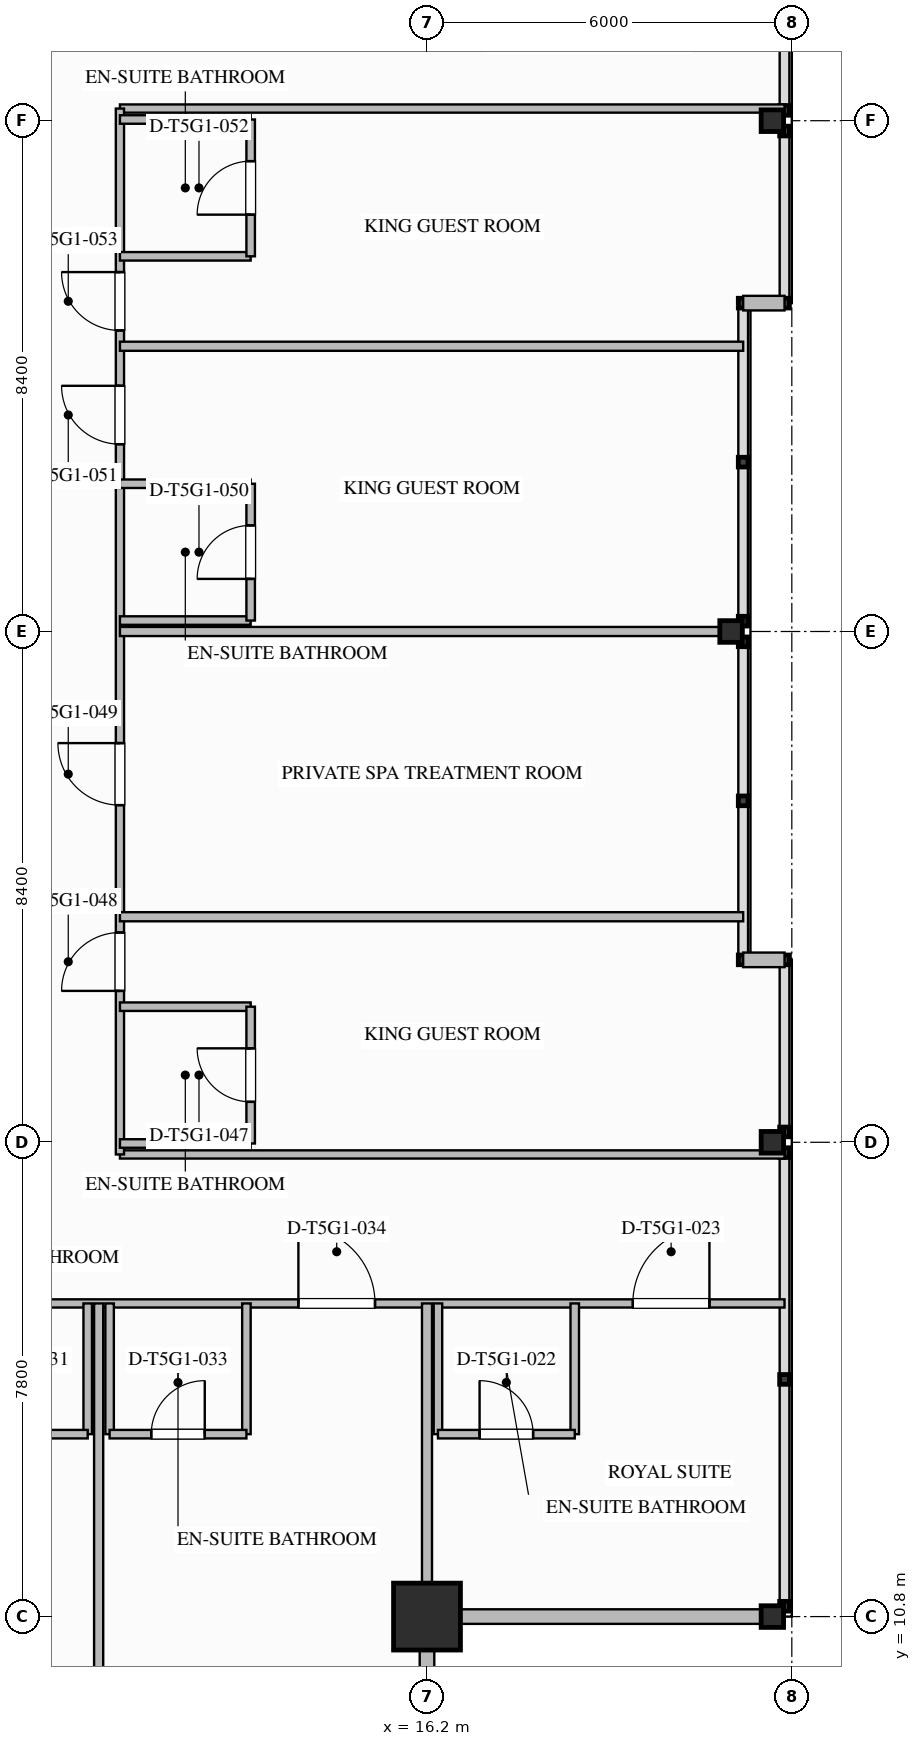
"""IFC4 building model, lengths in metres.
Left out: names, types, materials, properties, quantities, classifications, styles, units other than length and angle.
Written with IfcOpenShell. Run it as: python <this file> out.ifc"""

import sys

from ifc_helpers import new_model, si_unit, direction, frame, frame_2d, origin, origin_2d, place, context, subcontext, project, spatial, rectangle, i_section, extrude, element, fill, save


model = new_model("IFC4")
c1 = context("Model", 3, precision=1e-05, world=origin(), true_north=direction((0.0, 1.0)))
c2 = subcontext(c1, "Body", "Model", "MODEL_VIEW")
j1 = project(units=[si_unit("LENGTHUNIT", "METRE"), si_unit("PLANEANGLEUNIT", "RADIAN")], contexts=[c1])
p1 = place(None, origin())
s1 = spatial("IfcSite", under=j1, at=p1, CompositionType="ELEMENT")
p2 = place(p1, origin())
s2 = spatial("IfcBuilding", under=s1, at=p2, CompositionType="ELEMENT")
p3 = place(p2, frame((0.0, 0.0, 272.3)))
s3 = spatial("IfcBuildingStorey", under=s2, at=p3, CompositionType="ELEMENT", Elevation=272.3)
p4 = place(p3, frame((16.2, 10.8, 0.0), z_axis=(0.0, 0.0, 1.0), x_axis=(1.0, 0.0, 0.0)))
e1 = element("IfcColumn", 1, at=p4, inside=s3, PredefinedType="COLUMN", context=c2, shape_type="SweptSolid", body=[
    extrude(rectangle(XDim=1.1, YDim=1.1, at=origin_2d()), origin(), (0.0, 0.0, 1.0), 3.65),
])
for number, where, z_axis, x_axis in (
    (2, (21.88, 10.8, 0.0), (0.0, 0.0, 1.0), (1.0, 0.0, 0.0)),
    (3, (21.88, 18.6, 0.0), (0.0, 0.0, 1.0), (1.0, 0.0, 0.0)),
    (4, (21.2, 27.0, 0.0), (0.0, 0.0, 1.0), (1.0, 0.0, 0.0)),
    (5, (21.88, 35.4, 0.0), (0.0, 0.0, 1.0), (1.0, 0.0, 0.0)),
):
    element("IfcColumn", number, at=place(p3, frame(where, z_axis=z_axis, x_axis=x_axis)), inside=s3, PredefinedType="COLUMN", context=c2, shape_type="SweptSolid", body=[
        extrude(i_section(OverallWidth=0.369, OverallDepth=0.356, WebThickness=0.011, FlangeThickness=0.018, FilletRadius=0.025, at=origin_2d()), origin(), (0.0, 0.0, 1.0), 3.647),
    ])
for number, where, z_axis, x_axis in (
    (6, (22.08, 10.8, 0.0), (0.0, 0.0, 1.0), (-1.0, 0.0, 0.0)),
    (7, (16.2, 10.8, 0.0), (0.0, 0.0, 1.0), (0.0, -1.0, 0.0)),
):
    element("IfcWall", number, at=place(p3, frame(where, z_axis=z_axis, x_axis=x_axis)), inside=s3, PredefinedType="STANDARD", context=c2, shape_type="SweptSolid", body=[
        extrude(rectangle(XDim=5.88, YDim=0.24, at=frame_2d((2.94, 0.0))), origin(), (0.0, 0.0, 1.0), 2.779),
    ])
for number, where, z_axis, x_axis in (
    (8, (22.08, 32.4, 0.0), (0.0, 0.0, 1.0), (-1.0, 0.0, 0.0)),
    (9, (21.4, 21.6, 0.0), (0.0, 0.0, 1.0), (1.0, 0.0, 0.0)),
):
    element("IfcWall", number, at=place(p3, frame(where, z_axis=z_axis, x_axis=x_axis)), inside=s3, PredefinedType="STANDARD", context=c2, shape_type="SweptSolid", body=[
        extrude(rectangle(XDim=0.68, YDim=0.24, at=frame_2d((0.34, 0.0))), origin(), (0.0, 0.0, 1.0), 3.39),
    ])
p5 = place(p3, frame((-16.2, 15.95, 0.0), z_axis=(0.0, 0.0, 1.0), x_axis=(1.0, 0.0, 0.0)))
e10 = element("IfcWall", 10, at=p5, inside=s3, PredefinedType="PARTITIONING", context=c2, shape_type="SweptSolid", body=[
    extrude(rectangle(XDim=38.28, YDim=0.135, at=frame_2d((19.14, 0.0))), origin(), (0.0, 0.0, 1.0), 3.39),
])
p6 = place(p5, frame((35.785, 0.0, 0.0)))
e11 = element("IfcOpeningElement", 11, at=p6, cuts=e10, PredefinedType="OPENING", context=c2, shape_type="SweptSolid", body=[
    extrude(rectangle(XDim=1.26, YDim=2.2, at=frame_2d((0.63, 1.1))), frame((0.0, 0.077, 0.0), z_axis=(0.0, -1.0, 0.0), x_axis=(1.0, 0.0, 0.0)), (0.0, 0.0, 1.0), 0.155),
])
p7 = place(p5, frame((3.285, 0.0, 0.0)))
e12 = element("IfcOpeningElement", 12, at=p7, cuts=e10, PredefinedType="OPENING", context=c2, shape_type="SweptSolid", body=[
    extrude(rectangle(XDim=1.26, YDim=2.2, at=frame_2d((0.63, 1.1))), frame((0.0, 0.077, 0.0), z_axis=(0.0, -1.0, 0.0), x_axis=(1.0, 0.0, 0.0)), (0.0, 0.0, 1.0), 0.155),
])
p8 = place(p5, frame((7.335, 0.0, 0.0)))
e13 = element("IfcOpeningElement", 13, at=p8, cuts=e10, PredefinedType="OPENING", context=c2, shape_type="SweptSolid", body=[
    extrude(rectangle(XDim=1.26, YDim=2.2, at=frame_2d((0.63, 1.1))), frame((0.0, 0.077, 0.0), z_axis=(0.0, -1.0, 0.0), x_axis=(1.0, 0.0, 0.0)), (0.0, 0.0, 1.0), 0.155),
])
p9 = place(p5, frame((15.69, 0.0, 0.0)))
e14 = element("IfcOpeningElement", 14, at=p9, cuts=e10, PredefinedType="OPENING", context=c2, shape_type="SweptSolid", body=[
    extrude(rectangle(XDim=1.02, YDim=2.15, at=frame_2d((0.51, 1.075))), frame((0.0, 0.077, 0.0), z_axis=(0.0, -1.0, 0.0), x_axis=(1.0, 0.0, 0.0)), (0.0, 0.0, 1.0), 0.155),
])
p10 = place(p5, frame((21.375, 0.0, 0.0)))
e15 = element("IfcOpeningElement", 15, at=p10, cuts=e10, PredefinedType="OPENING", context=c2, shape_type="SweptSolid", body=[
    extrude(rectangle(XDim=1.26, YDim=2.2, at=frame_2d((0.63, 1.1))), frame((0.0, 0.077, 0.0), z_axis=(0.0, -1.0, 0.0), x_axis=(1.0, 0.0, 0.0)), (0.0, 0.0, 1.0), 0.155),
])
p11 = place(p5, frame((30.285, 0.0, 0.0)))
e16 = element("IfcOpeningElement", 16, at=p11, cuts=e10, PredefinedType="OPENING", context=c2, shape_type="SweptSolid", body=[
    extrude(rectangle(XDim=1.26, YDim=2.2, at=frame_2d((0.63, 1.1))), frame((0.0, 0.077, 0.0), z_axis=(0.0, -1.0, 0.0), x_axis=(1.0, 0.0, 0.0)), (0.0, 0.0, 1.0), 0.155),
])
for number, where, z_axis, x_axis in (
    (17, (11.15, 18.4, 0.0), (0.0, 0.0, 1.0), (1.0, 0.0, 0.0)),
    (18, (11.15, 35.6, 0.0), (0.0, 0.0, 1.0), (1.0, 0.0, 0.0)),
):
    element("IfcWall", number, at=place(p3, frame(where, z_axis=z_axis, x_axis=x_axis)), inside=s3, PredefinedType="PARTITIONING", context=c2, shape_type="SweptSolid", body=[
        extrude(rectangle(XDim=10.93, YDim=0.135, at=frame_2d((5.465, 0.0))), origin(), (0.0, 0.0, 1.0), 2.767),
    ])
p12 = place(p3, frame((11.15, 18.4, 0.0), z_axis=(0.0, 0.0, 1.0), x_axis=(0.0, 1.0, 0.0)))
e19 = element("IfcWall", 19, at=p12, inside=s3, PredefinedType="PARTITIONING", context=c2, shape_type="SweptSolid", body=[
    extrude(rectangle(XDim=17.2, YDim=0.135, at=frame_2d((8.6, 0.0))), origin(), (0.0, 0.0, 1.0), 3.39),
])
p13 = place(p12, frame((2.689, 0.0, 0.0)))
e20 = element("IfcOpeningElement", 20, at=p13, cuts=e19, PredefinedType="OPENING", context=c2, shape_type="SweptSolid", body=[
    extrude(rectangle(XDim=0.96, YDim=2.15, at=frame_2d((0.48, 1.075))), frame((0.0, 0.077, 0.0), z_axis=(0.0, -1.0, 0.0), x_axis=(1.0, 0.0, 0.0)), (0.0, 0.0, 1.0), 0.155),
])
p14 = place(p12, frame((5.745, 0.0, 0.0)))
e21 = element("IfcOpeningElement", 21, at=p14, cuts=e19, PredefinedType="OPENING", context=c2, shape_type="SweptSolid", body=[
    extrude(rectangle(XDim=1.02, YDim=2.15, at=frame_2d((0.51, 1.075))), frame((0.0, 0.077, 0.0), z_axis=(0.0, -1.0, 0.0), x_axis=(1.0, 0.0, 0.0)), (0.0, 0.0, 1.0), 0.155),
])
p15 = place(p12, frame((11.68, 0.0, 0.0)))
e22 = element("IfcOpeningElement", 22, at=p15, cuts=e19, PredefinedType="OPENING", context=c2, shape_type="SweptSolid", body=[
    extrude(rectangle(XDim=0.96, YDim=2.15, at=frame_2d((0.48, 1.075))), frame((0.0, 0.077, 0.0), z_axis=(0.0, -1.0, 0.0), x_axis=(1.0, 0.0, 0.0)), (0.0, 0.0, 1.0), 0.155),
])
p16 = place(p12, frame((13.551, 0.0, 0.0)))
e23 = element("IfcOpeningElement", 23, at=p16, cuts=e19, PredefinedType="OPENING", context=c2, shape_type="SweptSolid", body=[
    extrude(rectangle(XDim=0.96, YDim=2.15, at=frame_2d((0.48, 1.075))), frame((0.0, 0.077, 0.0), z_axis=(0.0, -1.0, 0.0), x_axis=(1.0, 0.0, 0.0)), (0.0, 0.0, 1.0), 0.155),
])
p17 = place(p3, frame((16.2, 10.92, 0.0), z_axis=(0.0, 0.0, 1.0), x_axis=(0.0, 1.0, 0.0)))
e24 = element("IfcWall", 24, at=p17, inside=s3, PredefinedType="PARTITIONING", context=c2, shape_type="SweptSolid", body=[
    extrude(rectangle(XDim=5.03, YDim=0.165, at=frame_2d((2.515, 0.0))), origin(), (0.0, 0.0, 1.0), 2.764),
])
p18 = place(p3, frame((16.38, 15.95, 0.0), z_axis=(0.0, 0.0, 1.0), x_axis=(0.0, -1.0, 0.0)))
e25 = element("IfcWall", 25, at=p18, inside=s3, PredefinedType="PLUMBINGWALL", context=c2, shape_type="SweptSolid", body=[
    extrude(rectangle(XDim=2.15, YDim=0.14, at=frame_2d((1.075, 0.0))), origin(), (0.0, 0.0, 1.0), 2.764),
])
p19 = place(p3, frame((18.63, 15.95, 0.0), z_axis=(0.0, 0.0, 1.0), x_axis=(0.0, -1.0, 0.0)))
e26 = element("IfcWall", 26, at=p19, inside=s3, PredefinedType="PLUMBINGWALL", context=c2, shape_type="SweptSolid", body=[
    extrude(rectangle(XDim=2.15, YDim=0.14, at=frame_2d((1.075, 0.0))), origin(), (0.0, 0.0, 1.0), 3.39),
])
p20 = place(p3, frame((16.38, 13.8, 0.0), z_axis=(0.0, 0.0, 1.0), x_axis=(1.0, 0.0, 0.0)))
e27 = element("IfcWall", 27, at=p20, inside=s3, PredefinedType="PLUMBINGWALL", context=c2, shape_type="SweptSolid", body=[
    extrude(rectangle(XDim=2.25, YDim=0.14, at=frame_2d((1.125, 0.0))), origin(), (0.0, 0.0, 1.0), 3.39),
])
p21 = place(p20, frame((0.685, 0.0, 0.0)))
e28 = element("IfcOpeningElement", 28, at=p21, cuts=e27, PredefinedType="OPENING", context=c2, shape_type="SweptSolid", body=[
    extrude(rectangle(XDim=0.88, YDim=2.1, at=frame_2d((0.44, 1.05))), frame((0.0, 0.08, 0.0), z_axis=(0.0, -1.0, 0.0), x_axis=(1.0, 0.0, 0.0)), (0.0, 0.0, 1.0), 0.16),
])
p22 = place(p3, frame((10.62, 15.95, 0.0), z_axis=(0.0, 0.0, 1.0), x_axis=(0.0, -1.0, 0.0)))
e29 = element("IfcWall", 29, at=p22, inside=s3, PredefinedType="PLUMBINGWALL", context=c2, shape_type="SweptSolid", body=[
    extrude(rectangle(XDim=2.15, YDim=0.14, at=frame_2d((1.075, 0.0))), origin(), (0.0, 0.0, 1.0), 3.39),
])
p23 = place(p3, frame((8.37, 13.8, 0.0), z_axis=(0.0, 0.0, 1.0), x_axis=(1.0, 0.0, 0.0)))
e30 = element("IfcWall", 30, at=p23, inside=s3, PredefinedType="PLUMBINGWALL", context=c2, shape_type="SweptSolid", body=[
    extrude(rectangle(XDim=2.25, YDim=0.14, at=frame_2d((1.125, 0.0))), origin(), (0.0, 0.0, 1.0), 3.39),
])
p24 = place(p23, frame((0.685, 0.0, 0.0)))
e31 = element("IfcOpeningElement", 31, at=p24, cuts=e30, PredefinedType="OPENING", context=c2, shape_type="SweptSolid", body=[
    extrude(rectangle(XDim=0.88, YDim=2.1, at=frame_2d((0.44, 1.05))), frame((0.0, 0.08, 0.0), z_axis=(0.0, -1.0, 0.0), x_axis=(1.0, 0.0, 0.0)), (0.0, 0.0, 1.0), 0.16),
])
p25 = place(p3, frame((10.8, 4.92, 0.0), z_axis=(0.0, 0.0, 1.0), x_axis=(0.0, 1.0, 0.0)))
e32 = element("IfcWall", 32, at=p25, inside=s3, PredefinedType="PARTITIONING", context=c2, shape_type="SweptSolid", body=[
    extrude(rectangle(XDim=11.03, YDim=0.15, at=frame_2d((5.515, 0.0))), origin(), (0.0, 0.0, 1.0), 3.39),
])
for number, where, z_axis, x_axis in (
    (33, (10.98, 15.95, 0.0), (0.0, 0.0, 1.0), (0.0, -1.0, 0.0)),
    (34, (13.23, 15.95, 0.0), (0.0, 0.0, 1.0), (0.0, -1.0, 0.0)),
):
    element("IfcWall", number, at=place(p3, frame(where, z_axis=z_axis, x_axis=x_axis)), inside=s3, PredefinedType="PLUMBINGWALL", context=c2, shape_type="SweptSolid", body=[
        extrude(rectangle(XDim=2.15, YDim=0.14, at=frame_2d((1.075, 0.0))), origin(), (0.0, 0.0, 1.0), 3.39),
    ])
p26 = place(p3, frame((10.98, 13.8, 0.0), z_axis=(0.0, 0.0, 1.0), x_axis=(1.0, 0.0, 0.0)))
e35 = element("IfcWall", 35, at=p26, inside=s3, PredefinedType="PLUMBINGWALL", context=c2, shape_type="SweptSolid", body=[
    extrude(rectangle(XDim=2.25, YDim=0.14, at=frame_2d((1.125, 0.0))), origin(), (0.0, 0.0, 1.0), 3.39),
])
p27 = place(p26, frame((0.685, 0.0, 0.0)))
e36 = element("IfcOpeningElement", 36, at=p27, cuts=e35, PredefinedType="OPENING", context=c2, shape_type="SweptSolid", body=[
    extrude(rectangle(XDim=0.88, YDim=2.1, at=frame_2d((0.44, 1.05))), frame((0.0, 0.08, 0.0), z_axis=(0.0, -1.0, 0.0), x_axis=(1.0, 0.0, 0.0)), (0.0, 0.0, 1.0), 0.16),
])
p28 = place(p3, frame((11.15, 18.58, 0.0), z_axis=(0.0, 0.0, 1.0), x_axis=(1.0, 0.0, 0.0)))
e37 = element("IfcWall", 37, at=p28, inside=s3, PredefinedType="PLUMBINGWALL", context=c2, shape_type="SweptSolid", body=[
    extrude(rectangle(XDim=2.15, YDim=0.14, at=frame_2d((1.075, 0.0))), origin(), (0.0, 0.0, 1.0), 2.767),
])
p29 = place(p3, frame((11.15, 20.83, 0.0), z_axis=(0.0, 0.0, 1.0), x_axis=(1.0, 0.0, 0.0)))
e38 = element("IfcWall", 38, at=p29, inside=s3, PredefinedType="PLUMBINGWALL", context=c2, shape_type="SweptSolid", body=[
    extrude(rectangle(XDim=2.15, YDim=0.14, at=frame_2d((1.075, 0.0))), origin(), (0.0, 0.0, 1.0), 3.39),
])
p30 = place(p3, frame((13.3, 18.58, 0.0), z_axis=(0.0, 0.0, 1.0), x_axis=(0.0, 1.0, 0.0)))
e39 = element("IfcWall", 39, at=p30, inside=s3, PredefinedType="PLUMBINGWALL", context=c2, shape_type="SweptSolid", body=[
    extrude(rectangle(XDim=2.25, YDim=0.14, at=frame_2d((1.125, 0.0))), origin(), (0.0, 0.0, 1.0), 3.39),
])
p31 = place(p30, frame((0.685, 0.0, 0.0)))
e40 = element("IfcOpeningElement", 40, at=p31, cuts=e39, PredefinedType="OPENING", context=c2, shape_type="SweptSolid", body=[
    extrude(rectangle(XDim=0.88, YDim=2.1, at=frame_2d((0.44, 1.05))), frame((0.0, 0.08, 0.0), z_axis=(0.0, -1.0, 0.0), x_axis=(1.0, 0.0, 0.0)), (0.0, 0.0, 1.0), 0.16),
])
p32 = place(p3, frame((11.15, 22.309, 0.0), z_axis=(0.0, 0.0, 1.0), x_axis=(1.0, 0.0, 0.0)))
e41 = element("IfcWall", 41, at=p32, inside=s3, PredefinedType="PARTITIONING", context=c2, shape_type="SweptSolid", body=[
    extrude(rectangle(XDim=10.25, YDim=0.15, at=frame_2d((5.125, 0.0))), origin(), (0.0, 0.0, 1.0), 3.39),
])
p33 = place(p3, frame((11.15, 27.0, 0.0), z_axis=(0.0, 0.0, 1.0), x_axis=(1.0, 0.0, 0.0)))
e42 = element("IfcWall", 42, at=p33, inside=s3, PredefinedType="PARTITIONING", context=c2, shape_type="SweptSolid", body=[
    extrude(rectangle(XDim=10.25, YDim=0.15, at=frame_2d((5.125, 0.0))), origin(), (0.0, 0.0, 1.0), 2.767),
])
p34 = place(p3, frame((11.15, 27.18, 0.0), z_axis=(0.0, 0.0, 1.0), x_axis=(1.0, 0.0, 0.0)))
e43 = element("IfcWall", 43, at=p34, inside=s3, PredefinedType="PLUMBINGWALL", context=c2, shape_type="SweptSolid", body=[
    extrude(rectangle(XDim=2.15, YDim=0.14, at=frame_2d((1.075, 0.0))), origin(), (0.0, 0.0, 1.0), 2.767),
])
p35 = place(p3, frame((11.15, 29.43, 0.0), z_axis=(0.0, 0.0, 1.0), x_axis=(1.0, 0.0, 0.0)))
e44 = element("IfcWall", 44, at=p35, inside=s3, PredefinedType="PLUMBINGWALL", context=c2, shape_type="SweptSolid", body=[
    extrude(rectangle(XDim=2.15, YDim=0.14, at=frame_2d((1.075, 0.0))), origin(), (0.0, 0.0, 1.0), 3.39),
])
p36 = place(p3, frame((13.3, 27.18, 0.0), z_axis=(0.0, 0.0, 1.0), x_axis=(0.0, 1.0, 0.0)))
e45 = element("IfcWall", 45, at=p36, inside=s3, PredefinedType="PLUMBINGWALL", context=c2, shape_type="SweptSolid", body=[
    extrude(rectangle(XDim=2.25, YDim=0.14, at=frame_2d((1.125, 0.0))), origin(), (0.0, 0.0, 1.0), 3.39),
])
p37 = place(p36, frame((0.685, 0.0, 0.0)))
e46 = element("IfcOpeningElement", 46, at=p37, cuts=e45, PredefinedType="OPENING", context=c2, shape_type="SweptSolid", body=[
    extrude(rectangle(XDim=0.88, YDim=2.1, at=frame_2d((0.44, 1.05))), frame((0.0, 0.08, 0.0), z_axis=(0.0, -1.0, 0.0), x_axis=(1.0, 0.0, 0.0)), (0.0, 0.0, 1.0), 0.16),
])
p38 = place(p3, frame((11.15, 31.691, 0.0), z_axis=(0.0, 0.0, 1.0), x_axis=(1.0, 0.0, 0.0)))
e47 = element("IfcWall", 47, at=p38, inside=s3, PredefinedType="PARTITIONING", context=c2, shape_type="SweptSolid", body=[
    extrude(rectangle(XDim=10.25, YDim=0.15, at=frame_2d((5.125, 0.0))), origin(), (0.0, 0.0, 1.0), 3.39),
])
p39 = place(p3, frame((11.15, 33.17, 0.0), z_axis=(0.0, 0.0, 1.0), x_axis=(1.0, 0.0, 0.0)))
e48 = element("IfcWall", 48, at=p39, inside=s3, PredefinedType="PLUMBINGWALL", context=c2, shape_type="SweptSolid", body=[
    extrude(rectangle(XDim=2.15, YDim=0.14, at=frame_2d((1.075, 0.0))), origin(), (0.0, 0.0, 1.0), 3.39),
])
p40 = place(p3, frame((11.15, 35.42, 0.0), z_axis=(0.0, 0.0, 1.0), x_axis=(1.0, 0.0, 0.0)))
e49 = element("IfcWall", 49, at=p40, inside=s3, PredefinedType="PLUMBINGWALL", context=c2, shape_type="SweptSolid", body=[
    extrude(rectangle(XDim=2.15, YDim=0.14, at=frame_2d((1.075, 0.0))), origin(), (0.0, 0.0, 1.0), 2.767),
])
p41 = place(p3, frame((13.3, 33.17, 0.0), z_axis=(0.0, 0.0, 1.0), x_axis=(0.0, 1.0, 0.0)))
e50 = element("IfcWall", 50, at=p41, inside=s3, PredefinedType="PLUMBINGWALL", context=c2, shape_type="SweptSolid", body=[
    extrude(rectangle(XDim=2.25, YDim=0.14, at=frame_2d((1.125, 0.0))), origin(), (0.0, 0.0, 1.0), 3.39),
])
p42 = place(p41, frame((0.685, 0.0, 0.0)))
e51 = element("IfcOpeningElement", 51, at=p42, cuts=e50, PredefinedType="OPENING", context=c2, shape_type="SweptSolid", body=[
    extrude(rectangle(XDim=0.88, YDim=2.1, at=frame_2d((0.44, 1.05))), frame((0.0, 0.08, 0.0), z_axis=(0.0, -1.0, 0.0), x_axis=(1.0, 0.0, 0.0)), (0.0, 0.0, 1.0), 0.16),
])
p43 = place(p21, origin())
e52 = element("IfcDoor", 52, at=p43, inside=s3, OperationType="SINGLE_SWING_LEFT", PredefinedType="DOOR", context=c2, shape_type="SweptSolid", body=[
    extrude(rectangle(XDim=0.88, YDim=2.1, at=frame_2d((0.44, 1.05))), frame((0.0, 0.025, 0.0), z_axis=(0.0, -1.0, 0.0), x_axis=(1.0, 0.0, 0.0)), (0.0, 0.0, 1.0), 0.05),
])
fill(e28, e52)
p44 = place(p6, origin())
e53 = element("IfcDoor", 53, at=p44, inside=s3, OperationType="SINGLE_SWING_RIGHT", PredefinedType="DOOR", context=c2, shape_type="SweptSolid", body=[
    extrude(rectangle(XDim=1.26, YDim=2.2, at=frame_2d((0.63, 1.1))), frame((0.0, 0.025, 0.0), z_axis=(0.0, -1.0, 0.0), x_axis=(1.0, 0.0, 0.0)), (0.0, 0.0, 1.0), 0.05),
])
fill(e11, e53)
p45 = place(p27, origin())
e54 = element("IfcDoor", 54, at=p45, inside=s3, OperationType="SINGLE_SWING_RIGHT", PredefinedType="DOOR", context=c2, shape_type="SweptSolid", body=[
    extrude(rectangle(XDim=0.88, YDim=2.1, at=frame_2d((0.44, 1.05))), frame((0.0, 0.025, 0.0), z_axis=(0.0, -1.0, 0.0), x_axis=(1.0, 0.0, 0.0)), (0.0, 0.0, 1.0), 0.05),
])
fill(e36, e54)
p46 = place(p11, origin())
e55 = element("IfcDoor", 55, at=p46, inside=s3, OperationType="SINGLE_SWING_LEFT", PredefinedType="DOOR", context=c2, shape_type="SweptSolid", body=[
    extrude(rectangle(XDim=1.26, YDim=2.2, at=frame_2d((0.63, 1.1))), frame((0.0, 0.025, 0.0), z_axis=(0.0, -1.0, 0.0), x_axis=(1.0, 0.0, 0.0)), (0.0, 0.0, 1.0), 0.05),
])
fill(e16, e55)
p47 = place(p31, origin())
e56 = element("IfcDoor", 56, at=p47, inside=s3, OperationType="SINGLE_SWING_RIGHT", PredefinedType="DOOR", context=c2, shape_type="SweptSolid", body=[
    extrude(rectangle(XDim=0.88, YDim=2.1, at=frame_2d((0.44, 1.05))), frame((0.0, 0.025, 0.0), z_axis=(0.0, -1.0, 0.0), x_axis=(1.0, 0.0, 0.0)), (0.0, 0.0, 1.0), 0.05),
])
fill(e40, e56)
p48 = place(p13, origin())
e57 = element("IfcDoor", 57, at=p48, inside=s3, OperationType="SINGLE_SWING_LEFT", PredefinedType="DOOR", context=c2, shape_type="SweptSolid", body=[
    extrude(rectangle(XDim=0.96, YDim=2.15, at=frame_2d((0.48, 1.075))), frame((0.0, 0.025, 0.0), z_axis=(0.0, -1.0, 0.0), x_axis=(1.0, 0.0, 0.0)), (0.0, 0.0, 1.0), 0.05),
])
fill(e20, e57)
p49 = place(p14, origin())
e58 = element("IfcDoor", 58, at=p49, inside=s3, OperationType="SINGLE_SWING_RIGHT", PredefinedType="DOOR", context=c2, shape_type="SweptSolid", body=[
    extrude(rectangle(XDim=1.02, YDim=2.15, at=frame_2d((0.51, 1.075))), frame((0.0, 0.025, 0.0), z_axis=(0.0, -1.0, 0.0), x_axis=(1.0, 0.0, 0.0)), (0.0, 0.0, 1.0), 0.05),
])
fill(e21, e58)
p50 = place(p37, origin())
e59 = element("IfcDoor", 59, at=p50, inside=s3, OperationType="SINGLE_SWING_LEFT", PredefinedType="DOOR", context=c2, shape_type="SweptSolid", body=[
    extrude(rectangle(XDim=0.88, YDim=2.1, at=frame_2d((0.44, 1.05))), frame((0.0, 0.025, 0.0), z_axis=(0.0, -1.0, 0.0), x_axis=(1.0, 0.0, 0.0)), (0.0, 0.0, 1.0), 0.05),
])
fill(e46, e59)
p51 = place(p15, origin())
e60 = element("IfcDoor", 60, at=p51, inside=s3, OperationType="SINGLE_SWING_RIGHT", PredefinedType="DOOR", context=c2, shape_type="SweptSolid", body=[
    extrude(rectangle(XDim=0.96, YDim=2.15, at=frame_2d((0.48, 1.075))), frame((0.0, 0.025, 0.0), z_axis=(0.0, -1.0, 0.0), x_axis=(1.0, 0.0, 0.0)), (0.0, 0.0, 1.0), 0.05),
])
fill(e22, e60)
p52 = place(p42, origin())
e61 = element("IfcDoor", 61, at=p52, inside=s3, OperationType="SINGLE_SWING_LEFT", PredefinedType="DOOR", context=c2, shape_type="SweptSolid", body=[
    extrude(rectangle(XDim=0.88, YDim=2.1, at=frame_2d((0.44, 1.05))), frame((0.0, 0.025, 0.0), z_axis=(0.0, -1.0, 0.0), x_axis=(1.0, 0.0, 0.0)), (0.0, 0.0, 1.0), 0.05),
])
fill(e51, e61)
p53 = place(p16, origin())
e62 = element("IfcDoor", 62, at=p53, inside=s3, OperationType="SINGLE_SWING_RIGHT", PredefinedType="DOOR", context=c2, shape_type="SweptSolid", body=[
    extrude(rectangle(XDim=0.96, YDim=2.15, at=frame_2d((0.48, 1.075))), frame((0.0, 0.025, 0.0), z_axis=(0.0, -1.0, 0.0), x_axis=(1.0, 0.0, 0.0)), (0.0, 0.0, 1.0), 0.05),
])
fill(e23, e62)
save(model, sys.argv[1])
